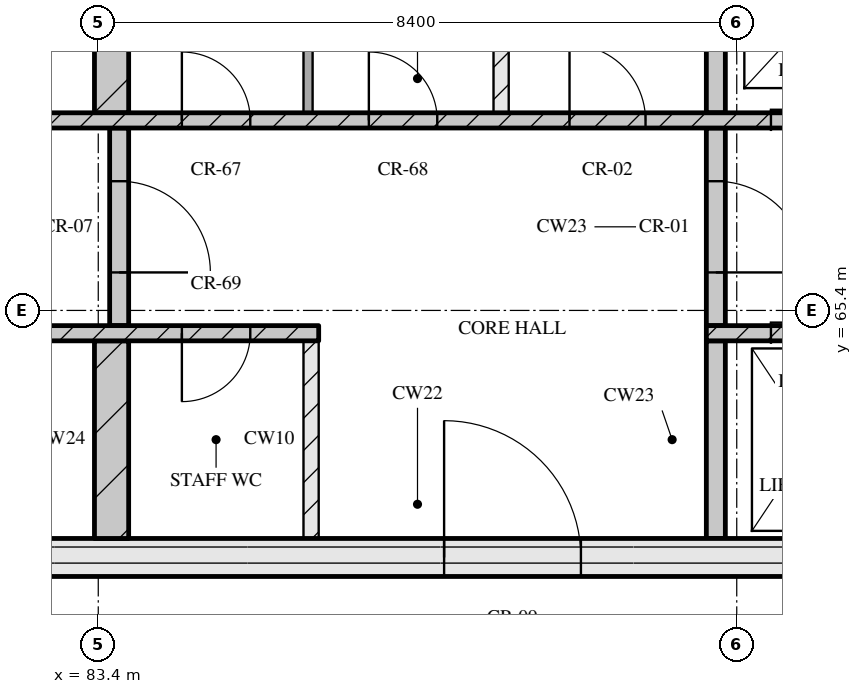
"""IFC4 building model, lengths in metres.
Left out: names, types, materials, properties, quantities, classifications, styles, units other than length and angle.
Written with IfcOpenShell. Run it as: python <this file> out.ifc"""

import sys

from ifc_helpers import new_model, si_unit, direction, frame, frame_2d, origin, place, context, subcontext, project, spatial, rectangle, extrude, element, fill, save


model = new_model("IFC4")
c1 = context("Model", 3, precision=1e-05, world=origin(), true_north=direction((0.0, 1.0)))
c2 = subcontext(c1, "Body", "Model", "MODEL_VIEW")
j1 = project(units=[si_unit("LENGTHUNIT", "METRE"), si_unit("PLANEANGLEUNIT", "RADIAN")], contexts=[c1])
p1 = place(None, origin())
s1 = spatial("IfcSite", under=j1, at=p1, CompositionType="ELEMENT")
p2 = place(p1, origin())
s2 = spatial("IfcBuilding", under=s1, at=p2, CompositionType="ELEMENT")
p3 = place(p2, frame((0.0, 0.0, 281.55)))
s3 = spatial("IfcBuildingStorey", under=s2, at=p3, CompositionType="ELEMENT", Elevation=281.55)
p4 = place(p3, frame((67.3, 62.15, 0.0), z_axis=(0.0, 0.0, 1.0), x_axis=(1.0, 0.0, 0.0)))
e1 = element("IfcWall", 1, at=p4, inside=s3, PredefinedType="SOLIDWALL", context=c2, shape_type="SweptSolid", body=[
    extrude(rectangle(XDim=40.6, YDim=0.5, at=frame_2d((20.3, 0.0))), origin(), (0.0, 0.0, 1.0), 3.32),
])
p5 = place(p4, frame((20.65, 0.0, 0.0)))
e2 = element("IfcOpeningElement", 2, at=p5, cuts=e1, PredefinedType="OPENING", context=c2, shape_type="SweptSolid", body=[
    extrude(rectangle(XDim=1.8, YDim=2.1, at=frame_2d((0.9, 1.05))), frame((0.0, 0.26, 0.0), z_axis=(0.0, -1.0, 0.0), x_axis=(1.0, 0.0, 0.0)), (0.0, 0.0, 1.0), 0.52),
])
p6 = place(p3, frame((83.575, 62.4, 0.0), z_axis=(0.0, 0.0, 1.0), x_axis=(0.0, 1.0, 0.0)))
e3 = element("IfcWall", 3, at=p6, inside=s3, PredefinedType="SOLIDWALL", context=c2, shape_type="SweptSolid", body=[
    extrude(rectangle(XDim=2.6, YDim=0.45, at=frame_2d((1.3, 0.0))), origin(), (0.0, 0.0, 1.0), 3.32),
])
p7 = place(p3, frame((86.2, 62.4, 0.0), z_axis=(0.0, 0.0, 1.0), x_axis=(0.0, 1.0, 0.0)))
e4 = element("IfcWall", 4, at=p7, inside=s3, PredefinedType="PARTITIONING", context=c2, shape_type="SweptSolid", body=[
    extrude(rectangle(XDim=2.6, YDim=0.2, at=frame_2d((1.3, 0.0))), origin(), (0.0, 0.0, 1.0), 3.32),
])
p8 = place(p3, frame((91.525, 62.4, 0.0), z_axis=(0.0, 0.0, 1.0), x_axis=(0.0, 1.0, 0.0)))
e5 = element("IfcWall", 5, at=p8, inside=s3, PredefinedType="SOLIDWALL", context=c2, shape_type="SweptSolid", body=[
    extrude(rectangle(XDim=2.6, YDim=0.25, at=frame_2d((1.3, 0.0))), origin(), (0.0, 0.0, 1.0), 3.32),
])
p9 = place(p3, frame((67.8, 65.1, 0.0), z_axis=(0.0, 0.0, 1.0), x_axis=(1.0, 0.0, 0.0)))
e6 = element("IfcWall", 6, at=p9, inside=s3, PredefinedType="SOLIDWALL", context=c2, shape_type="SweptSolid", body=[
    extrude(rectangle(XDim=18.5, YDim=0.2, at=frame_2d((9.25, 0.0))), origin(), (0.0, 0.0, 1.0), 3.32),
])
p10 = place(p9, frame((7.27, 0.0, 0.0)))
e7 = element("IfcOpeningElement", 7, at=p10, cuts=e6, PredefinedType="OPENING", context=c2, shape_type="SweptSolid", body=[
    extrude(rectangle(XDim=0.9, YDim=2.1, at=frame_2d((0.45, 1.05))), frame((0.0, 0.11, 0.0), z_axis=(0.0, -1.0, 0.0), x_axis=(1.0, 0.0, 0.0)), (0.0, 0.0, 1.0), 0.22),
])
p11 = place(p9, frame((9.05, 0.0, 0.0)))
e8 = element("IfcOpeningElement", 8, at=p11, cuts=e6, PredefinedType="OPENING", context=c2, shape_type="SweptSolid", body=[
    extrude(rectangle(XDim=0.9, YDim=2.1, at=frame_2d((0.45, 1.05))), frame((0.0, 0.11, 0.0), z_axis=(0.0, -1.0, 0.0), x_axis=(1.0, 0.0, 0.0)), (0.0, 0.0, 1.0), 0.22),
])
p12 = place(p9, frame((12.76, 0.0, 0.0)))
e9 = element("IfcOpeningElement", 9, at=p12, cuts=e6, PredefinedType="OPENING", context=c2, shape_type="SweptSolid", body=[
    extrude(rectangle(XDim=0.9, YDim=2.1, at=frame_2d((0.45, 1.05))), frame((0.0, 0.11, 0.0), z_axis=(0.0, -1.0, 0.0), x_axis=(1.0, 0.0, 0.0)), (0.0, 0.0, 1.0), 0.22),
])
p13 = place(p9, frame((16.7, 0.0, 0.0)))
e10 = element("IfcOpeningElement", 10, at=p13, cuts=e6, PredefinedType="OPENING", context=c2, shape_type="SweptSolid", body=[
    extrude(rectangle(XDim=0.9, YDim=2.1, at=frame_2d((0.45, 1.05))), frame((0.0, 0.11, 0.0), z_axis=(0.0, -1.0, 0.0), x_axis=(1.0, 0.0, 0.0)), (0.0, 0.0, 1.0), 0.22),
])
p14 = place(p3, frame((91.4, 65.1, 0.0), z_axis=(0.0, 0.0, 1.0), x_axis=(1.0, 0.0, 0.0)))
e11 = element("IfcWall", 11, at=p14, inside=s3, PredefinedType="SOLIDWALL", context=c2, shape_type="SweptSolid", body=[
    extrude(rectangle(XDim=16.0, YDim=0.2, at=frame_2d((8.0, 0.0))), origin(), (0.0, 0.0, 1.0), 3.32),
])
p15 = place(p14, frame((0.85, 0.0, 0.0)))
e12 = element("IfcOpeningElement", 12, at=p15, cuts=e11, PredefinedType="OPENING", context=c2, shape_type="SweptSolid", body=[
    extrude(rectangle(XDim=1.1, YDim=2.1, at=frame_2d((0.55, 1.05))), frame((0.0, 0.11, 0.0), z_axis=(0.0, -1.0, 0.0), x_axis=(1.0, 0.0, 0.0)), (0.0, 0.0, 1.0), 0.22),
])
p16 = place(p14, frame((3.35, 0.0, 0.0)))
e13 = element("IfcOpeningElement", 13, at=p16, cuts=e11, PredefinedType="OPENING", context=c2, shape_type="SweptSolid", body=[
    extrude(rectangle(XDim=1.1, YDim=2.1, at=frame_2d((0.55, 1.05))), frame((0.0, 0.11, 0.0), z_axis=(0.0, -1.0, 0.0), x_axis=(1.0, 0.0, 0.0)), (0.0, 0.0, 1.0), 0.22),
])
p17 = place(p14, frame((5.85, 0.0, 0.0)))
e14 = element("IfcOpeningElement", 14, at=p17, cuts=e11, PredefinedType="OPENING", context=c2, shape_type="SweptSolid", body=[
    extrude(rectangle(XDim=1.1, YDim=2.1, at=frame_2d((0.55, 1.05))), frame((0.0, 0.11, 0.0), z_axis=(0.0, -1.0, 0.0), x_axis=(1.0, 0.0, 0.0)), (0.0, 0.0, 1.0), 0.22),
])
p18 = place(p14, frame((7.83, 0.0, 0.0)))
e15 = element("IfcOpeningElement", 15, at=p18, cuts=e11, PredefinedType="OPENING", context=c2, shape_type="SweptSolid", body=[
    extrude(rectangle(XDim=0.9, YDim=2.1, at=frame_2d((0.45, 1.05))), frame((0.0, 0.11, 0.0), z_axis=(0.0, -1.0, 0.0), x_axis=(1.0, 0.0, 0.0)), (0.0, 0.0, 1.0), 0.22),
])
p19 = place(p3, frame((83.675, 65.2, 0.0), z_axis=(0.0, 0.0, 1.0), x_axis=(0.0, 1.0, 0.0)))
e16 = element("IfcWall", 16, at=p19, inside=s3, PredefinedType="SOLIDWALL", context=c2, shape_type="SweptSolid", body=[
    extrude(rectangle(XDim=2.6, YDim=0.25, at=frame_2d((1.3, 0.0))), origin(), (0.0, 0.0, 1.0), 3.32),
])
p20 = place(p19, frame((0.7, 0.0, 0.0)))
e17 = element("IfcOpeningElement", 17, at=p20, cuts=e16, PredefinedType="OPENING", context=c2, shape_type="SweptSolid", body=[
    extrude(rectangle(XDim=1.2, YDim=2.1, at=frame_2d((0.6, 1.05))), frame((0.0, 0.135, 0.0), z_axis=(0.0, -1.0, 0.0), x_axis=(1.0, 0.0, 0.0)), (0.0, 0.0, 1.0), 0.27),
])
p21 = place(p3, frame((91.525, 65.2, 0.0), z_axis=(0.0, 0.0, 1.0), x_axis=(0.0, 1.0, 0.0)))
e18 = element("IfcWall", 18, at=p21, inside=s3, PredefinedType="SOLIDWALL", context=c2, shape_type="SweptSolid", body=[
    extrude(rectangle(XDim=2.6, YDim=0.25, at=frame_2d((1.3, 0.0))), origin(), (0.0, 0.0, 1.0), 3.32),
])
p22 = place(p21, frame((0.7, 0.0, 0.0)))
e19 = element("IfcOpeningElement", 19, at=p22, cuts=e18, PredefinedType="OPENING", context=c2, shape_type="SweptSolid", body=[
    extrude(rectangle(XDim=1.2, YDim=2.1, at=frame_2d((0.6, 1.05))), frame((0.0, 0.135, 0.0), z_axis=(0.0, -1.0, 0.0), x_axis=(1.0, 0.0, 0.0)), (0.0, 0.0, 1.0), 0.27),
])
p23 = place(p3, frame((76.05, 67.9, 0.0), z_axis=(0.0, 0.0, 1.0), x_axis=(1.0, 0.0, 0.0)))
e20 = element("IfcWall", 20, at=p23, inside=s3, PredefinedType="SOLIDWALL", context=c2, shape_type="SweptSolid", body=[
    extrude(rectangle(XDim=23.1, YDim=0.2, at=frame_2d((11.55, 0.0))), origin(), (0.0, 0.0, 1.0), 3.32),
])
p24 = place(p23, frame((1.35, 0.0, 0.0)))
e21 = element("IfcOpeningElement", 21, at=p24, cuts=e20, PredefinedType="OPENING", context=c2, shape_type="SweptSolid", body=[
    extrude(rectangle(XDim=0.9, YDim=2.1, at=frame_2d((0.45, 1.05))), frame((0.0, 0.11, 0.0), z_axis=(0.0, -1.0, 0.0), x_axis=(1.0, 0.0, 0.0)), (0.0, 0.0, 1.0), 0.22),
])
p25 = place(p23, frame((5.06, 0.0, 0.0)))
e22 = element("IfcOpeningElement", 22, at=p25, cuts=e20, PredefinedType="OPENING", context=c2, shape_type="SweptSolid", body=[
    extrude(rectangle(XDim=0.9, YDim=2.1, at=frame_2d((0.45, 1.05))), frame((0.0, 0.11, 0.0), z_axis=(0.0, -1.0, 0.0), x_axis=(1.0, 0.0, 0.0)), (0.0, 0.0, 1.0), 0.22),
])
p26 = place(p23, frame((8.45, 0.0, 0.0)))
e23 = element("IfcOpeningElement", 23, at=p26, cuts=e20, PredefinedType="OPENING", context=c2, shape_type="SweptSolid", body=[
    extrude(rectangle(XDim=0.9, YDim=2.1, at=frame_2d((0.45, 1.05))), frame((0.0, 0.11, 0.0), z_axis=(0.0, -1.0, 0.0), x_axis=(1.0, 0.0, 0.0)), (0.0, 0.0, 1.0), 0.22),
])
p27 = place(p23, frame((10.91, 0.0, 0.0)))
e24 = element("IfcOpeningElement", 24, at=p27, cuts=e20, PredefinedType="OPENING", context=c2, shape_type="SweptSolid", body=[
    extrude(rectangle(XDim=0.9, YDim=2.1, at=frame_2d((0.45, 1.05))), frame((0.0, 0.11, 0.0), z_axis=(0.0, -1.0, 0.0), x_axis=(1.0, 0.0, 0.0)), (0.0, 0.0, 1.0), 0.22),
])
p28 = place(p23, frame((13.55, 0.0, 0.0)))
e25 = element("IfcOpeningElement", 25, at=p28, cuts=e20, PredefinedType="OPENING", context=c2, shape_type="SweptSolid", body=[
    extrude(rectangle(XDim=1.0, YDim=2.1, at=frame_2d((0.5, 1.05))), frame((0.0, 0.11, 0.0), z_axis=(0.0, -1.0, 0.0), x_axis=(1.0, 0.0, 0.0)), (0.0, 0.0, 1.0), 0.22),
])
p29 = place(p23, frame((16.2, 0.0, 0.0)))
e26 = element("IfcOpeningElement", 26, at=p29, cuts=e20, PredefinedType="OPENING", context=c2, shape_type="SweptSolid", body=[
    extrude(rectangle(XDim=1.1, YDim=2.1, at=frame_2d((0.55, 1.05))), frame((0.0, 0.11, 0.0), z_axis=(0.0, -1.0, 0.0), x_axis=(1.0, 0.0, 0.0)), (0.0, 0.0, 1.0), 0.22),
])
p30 = place(p23, frame((18.7, 0.0, 0.0)))
e27 = element("IfcOpeningElement", 27, at=p30, cuts=e20, PredefinedType="OPENING", context=c2, shape_type="SweptSolid", body=[
    extrude(rectangle(XDim=1.1, YDim=2.1, at=frame_2d((0.55, 1.05))), frame((0.0, 0.11, 0.0), z_axis=(0.0, -1.0, 0.0), x_axis=(1.0, 0.0, 0.0)), (0.0, 0.0, 1.0), 0.22),
])
p31 = place(p23, frame((21.2, 0.0, 0.0)))
e28 = element("IfcOpeningElement", 28, at=p31, cuts=e20, PredefinedType="OPENING", context=c2, shape_type="SweptSolid", body=[
    extrude(rectangle(XDim=1.1, YDim=2.1, at=frame_2d((0.55, 1.05))), frame((0.0, 0.11, 0.0), z_axis=(0.0, -1.0, 0.0), x_axis=(1.0, 0.0, 0.0)), (0.0, 0.0, 1.0), 0.22),
])
p32 = place(p3, frame((83.575, 68.0, 0.0), z_axis=(0.0, 0.0, 1.0), x_axis=(0.0, 1.0, 0.0)))
e29 = element("IfcWall", 29, at=p32, inside=s3, PredefinedType="SOLIDWALL", context=c2, shape_type="SweptSolid", body=[
    extrude(rectangle(XDim=2.6, YDim=0.45, at=frame_2d((1.3, 0.0))), origin(), (0.0, 0.0, 1.0), 3.32),
])
p33 = place(p3, frame((86.16, 68.0, 0.0), z_axis=(0.0, 0.0, 1.0), x_axis=(0.0, 1.0, 0.0)))
e30 = element("IfcWall", 30, at=p33, inside=s3, PredefinedType="PARTITIONING", context=c2, shape_type="SweptSolid", body=[
    extrude(rectangle(XDim=2.6, YDim=0.12, at=frame_2d((1.3, 0.0))), origin(), (0.0, 0.0, 1.0), 3.32),
])
p34 = place(p3, frame((88.7, 68.0, 0.0), z_axis=(0.0, 0.0, 1.0), x_axis=(0.0, 1.0, 0.0)))
e31 = element("IfcWall", 31, at=p34, inside=s3, PredefinedType="PARTITIONING", context=c2, shape_type="SweptSolid", body=[
    extrude(rectangle(XDim=2.6, YDim=0.2, at=frame_2d((1.3, 0.0))), origin(), (0.0, 0.0, 1.0), 3.32),
])
p35 = place(p3, frame((91.525, 68.0, 0.0), z_axis=(0.0, 0.0, 1.0), x_axis=(0.0, 1.0, 0.0)))
e32 = element("IfcWall", 32, at=p35, inside=s3, PredefinedType="SOLIDWALL", context=c2, shape_type="SweptSolid", body=[
    extrude(rectangle(XDim=2.6, YDim=0.25, at=frame_2d((1.3, 0.0))), origin(), (0.0, 0.0, 1.0), 3.32),
])
p36 = place(p5, origin())
e33 = element("IfcDoor", 33, at=p36, inside=s3, OperationType="DOUBLE_DOOR_SINGLE_SWING", PredefinedType="DOOR", context=c2, shape_type="SweptSolid", body=[
    extrude(rectangle(XDim=1.8, YDim=2.1, at=frame_2d((0.9, 1.05))), frame((0.0, 0.025, 0.0), z_axis=(0.0, -1.0, 0.0), x_axis=(1.0, 0.0, 0.0)), (0.0, 0.0, 1.0), 0.05),
])
fill(e2, e33)
p37 = place(p13, origin())
e34 = element("IfcDoor", 34, at=p37, inside=s3, OperationType="SINGLE_SWING_RIGHT", PredefinedType="DOOR", context=c2, shape_type="SweptSolid", body=[
    extrude(rectangle(XDim=0.9, YDim=2.1, at=frame_2d((0.45, 1.05))), frame((0.0, 0.025, 0.0), z_axis=(0.0, -1.0, 0.0), x_axis=(1.0, 0.0, 0.0)), (0.0, 0.0, 1.0), 0.05),
])
fill(e10, e34)
p38 = place(p15, origin())
e35 = element("IfcDoor", 35, at=p38, inside=s3, OperationType="SLIDING_TO_LEFT", PredefinedType="DOOR", context=c2, shape_type="SweptSolid", body=[
    extrude(rectangle(XDim=1.1, YDim=2.1, at=frame_2d((0.55, 1.05))), frame((0.0, 0.025, 0.0), z_axis=(0.0, -1.0, 0.0), x_axis=(1.0, 0.0, 0.0)), (0.0, 0.0, 1.0), 0.05),
])
fill(e12, e35)
p39 = place(p20, origin())
e36 = element("IfcDoor", 36, at=p39, inside=s3, OperationType="SINGLE_SWING_RIGHT", PredefinedType="DOOR", context=c2, shape_type="SweptSolid", body=[
    extrude(rectangle(XDim=1.2, YDim=2.1, at=frame_2d((0.6, 1.05))), frame((0.0, 0.025, 0.0), z_axis=(0.0, -1.0, 0.0), x_axis=(1.0, 0.0, 0.0)), (0.0, 0.0, 1.0), 0.05),
])
fill(e17, e36)
p40 = place(p22, origin())
e37 = element("IfcDoor", 37, at=p40, inside=s3, OperationType="SINGLE_SWING_RIGHT", PredefinedType="DOOR", context=c2, shape_type="SweptSolid", body=[
    extrude(rectangle(XDim=1.2, YDim=2.1, at=frame_2d((0.6, 1.05))), frame((0.0, 0.025, 0.0), z_axis=(0.0, -1.0, 0.0), x_axis=(1.0, 0.0, 0.0)), (0.0, 0.0, 1.0), 0.05),
])
fill(e19, e37)
p41 = place(p26, origin())
e38 = element("IfcDoor", 38, at=p41, inside=s3, OperationType="SINGLE_SWING_LEFT", PredefinedType="DOOR", context=c2, shape_type="SweptSolid", body=[
    extrude(rectangle(XDim=0.9, YDim=2.1, at=frame_2d((0.45, 1.05))), frame((0.0, 0.025, 0.0), z_axis=(0.0, -1.0, 0.0), x_axis=(1.0, 0.0, 0.0)), (0.0, 0.0, 1.0), 0.05),
])
fill(e23, e38)
p42 = place(p27, origin())
e39 = element("IfcDoor", 39, at=p42, inside=s3, OperationType="SINGLE_SWING_LEFT", PredefinedType="DOOR", context=c2, shape_type="SweptSolid", body=[
    extrude(rectangle(XDim=0.9, YDim=2.1, at=frame_2d((0.45, 1.05))), frame((0.0, 0.025, 0.0), z_axis=(0.0, -1.0, 0.0), x_axis=(1.0, 0.0, 0.0)), (0.0, 0.0, 1.0), 0.05),
])
fill(e24, e39)
p43 = place(p28, origin())
e40 = element("IfcDoor", 40, at=p43, inside=s3, OperationType="SINGLE_SWING_LEFT", PredefinedType="DOOR", context=c2, shape_type="SweptSolid", body=[
    extrude(rectangle(XDim=1.0, YDim=2.1, at=frame_2d((0.5, 1.05))), frame((0.0, 0.025, 0.0), z_axis=(0.0, -1.0, 0.0), x_axis=(1.0, 0.0, 0.0)), (0.0, 0.0, 1.0), 0.05),
])
fill(e25, e40)
p44 = place(p29, origin())
e41 = element("IfcDoor", 41, at=p44, inside=s3, OperationType="SLIDING_TO_RIGHT", PredefinedType="DOOR", context=c2, shape_type="SweptSolid", body=[
    extrude(rectangle(XDim=1.1, YDim=2.1, at=frame_2d((0.55, 1.05))), frame((0.0, 0.025, 0.0), z_axis=(0.0, -1.0, 0.0), x_axis=(1.0, 0.0, 0.0)), (0.0, 0.0, 1.0), 0.05),
])
fill(e26, e41)
save(model, sys.argv[1])
